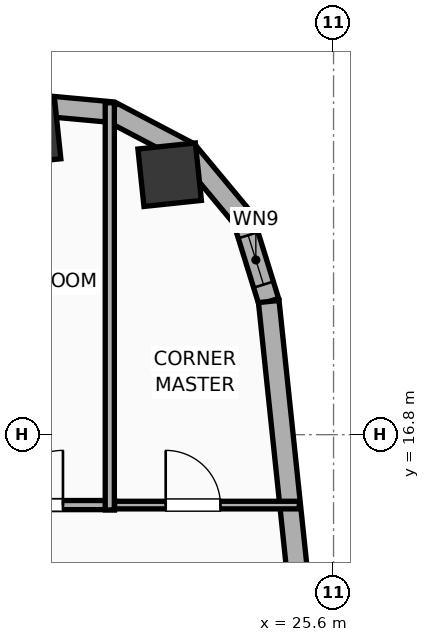
"""IFC4 building model, lengths in metres.
Left out: names, types, materials, properties, quantities, classifications, styles, units other than length and angle.
Written with IfcOpenShell. Run it as: python <this file> out.ifc"""

import sys

from ifc_helpers import new_model, si_unit, direction, frame, frame_2d, origin, origin_2d, place, context, subcontext, project, spatial, rectangle, hollow_rectangle, hollow_circle, extrude, element, fill, save


model = new_model("IFC4")
c1 = context("Model", 3, precision=1e-05, world=origin(), true_north=direction((0.0, 1.0)))
c2 = subcontext(c1, "Body", "Model", "MODEL_VIEW")
j1 = project(units=[si_unit("LENGTHUNIT", "METRE"), si_unit("PLANEANGLEUNIT", "RADIAN")], contexts=[c1])
p1 = place(None, origin())
s1 = spatial("IfcSite", under=j1, at=p1, CompositionType="ELEMENT")
p2 = place(p1, origin())
s2 = spatial("IfcBuilding", under=s1, at=p2, CompositionType="ELEMENT")
p3 = place(p2, frame((0.0, 0.0, 163.8)))
s3 = spatial("IfcBuildingStorey", under=s2, at=p3, CompositionType="ELEMENT", Elevation=163.8)
p4 = place(p3, frame((22.905, 21.075, 0.0), z_axis=(0.0, 0.0, 1.0), x_axis=(0.994521895368, 0.104528463268, 0.0)))
e1 = element("IfcColumn", 1, at=p4, inside=s3, PredefinedType="COLUMN", context=c2, shape_type="SweptSolid", body=[
    extrude(hollow_circle(Radius=0.475, WallThickness=0.032, at=origin_2d()), origin(), (0.0, 0.0, 1.0), 3.9),
])
p5 = place(p3, frame((20.593, 21.76, 0.0), z_axis=(0.0, 0.0, 1.0), x_axis=(0.994521895368, 0.104528463268, 0.0)))
e2 = element("IfcColumn", 2, at=p5, inside=s3, PredefinedType="COLUMN", context=c2, shape_type="SweptSolid", body=[
    extrude(hollow_rectangle(XDim=0.95, YDim=0.95, WallThickness=0.032, at=origin_2d()), origin(), (0.0, 0.0, 1.0), 3.9),
])
p6 = place(p3, frame((20.526, 22.235, 0.0), z_axis=(0.0, 0.0, 1.0), x_axis=(0.995800460351, -0.091550222087, 0.0)))
e3 = element("IfcWall", 3, at=p6, inside=s3, PredefinedType="ELEMENTEDWALL", context=c2, shape_type="SweptSolid", body=[
    extrude(rectangle(XDim=1.432, YDim=0.34, at=frame_2d((0.716, 0.0))), origin(), (0.0, 0.0, 1.0), 3.65),
])
p7 = place(p3, frame((21.952, 22.104, 0.0), z_axis=(0.0, 0.0, 1.0), x_axis=(0.885023004245, -0.465547292933, 0.0)))
e4 = element("IfcWall", 4, at=p7, inside=s3, PredefinedType="ELEMENTEDWALL", context=c2, shape_type="SweptSolid", body=[
    extrude(rectangle(XDim=1.415, YDim=0.34, at=frame_2d((0.708, 0.0))), origin(), (0.0, 0.0, 1.0), 3.65),
])
p8 = place(p3, frame((23.205, 21.445, 0.0), z_axis=(0.0, 0.0, 1.0), x_axis=(0.639539337522, -0.768758372808, 0.0)))
e5 = element("IfcWall", 5, at=p8, inside=s3, PredefinedType="ELEMENTEDWALL", context=c2, shape_type="SweptSolid", body=[
    extrude(rectangle(XDim=1.415, YDim=0.34, at=frame_2d((0.708, 0.0))), origin(), (0.0, 0.0, 1.0), 3.65),
])
p9 = place(p3, frame((24.11, 20.357, 0.0), z_axis=(0.0, 0.0, 1.0), x_axis=(0.296420660287, -0.955057481074, 0.0)))
e6 = element("IfcWall", 6, at=p9, inside=s3, PredefinedType="ELEMENTEDWALL", context=c2, shape_type="SweptSolid", body=[
    extrude(rectangle(XDim=1.432, YDim=0.34, at=frame_2d((0.716, 0.0))), origin(), (0.0, 0.0, 1.0), 3.65),
])
p10 = place(p9, frame((0.291, 0.0, 0.75)))
e7 = element("IfcOpeningElement", 7, at=p10, cuts=e6, PredefinedType="OPENING", context=c2, shape_type="SweptSolid", body=[
    extrude(rectangle(XDim=0.85, YDim=2.05, at=frame_2d((0.425, 1.025))), frame((0.0, 0.18, 0.0), z_axis=(0.0, -1.0, 0.0), x_axis=(1.0, 0.0, 0.0)), (0.0, 0.0, 1.0), 0.36),
])
p11 = place(p3, frame((24.534, 18.99, 0.0), z_axis=(0.0, 0.0, 1.0), x_axis=(0.104534959766, -0.994521212537, 0.0)))
e8 = element("IfcWall", 8, at=p11, inside=s3, PredefinedType="ELEMENTEDWALL", context=c2, shape_type="SweptSolid", body=[
    extrude(rectangle(XDim=33.166, YDim=0.34, at=frame_2d((16.583, 0.0))), origin(), (0.0, 0.0, 1.0), 3.65),
])
p12 = place(p11, frame((6.542, 0.0, 0.75)))
e9 = element("IfcOpeningElement", 9, at=p12, cuts=e8, PredefinedType="OPENING", context=c2, shape_type="SweptSolid", body=[
    extrude(rectangle(XDim=1.8, YDim=2.1, at=frame_2d((0.9, 1.05))), frame((0.0, 0.18, 0.0), z_axis=(0.0, -1.0, 0.0), x_axis=(1.0, 0.0, 0.0)), (0.0, 0.0, 1.0), 0.36),
])
p13 = place(p11, frame((24.825, 0.0, 0.75)))
e10 = element("IfcOpeningElement", 10, at=p13, cuts=e8, PredefinedType="OPENING", context=c2, shape_type="SweptSolid", body=[
    extrude(rectangle(XDim=1.8, YDim=2.1, at=frame_2d((0.9, 1.05))), frame((0.0, 0.18, 0.0), z_axis=(0.0, -1.0, 0.0), x_axis=(1.0, 0.0, 0.0)), (0.0, 0.0, 1.0), 0.36),
])
p14 = place(p11, frame((20.332, 0.0, 0.75)))
e11 = element("IfcOpeningElement", 11, at=p14, cuts=e8, PredefinedType="OPENING", context=c2, shape_type="SweptSolid", body=[
    extrude(rectangle(XDim=1.2, YDim=2.05, at=frame_2d((0.6, 1.025))), frame((0.0, 0.18, 0.0), z_axis=(0.0, -1.0, 0.0), x_axis=(1.0, 0.0, 0.0)), (0.0, 0.0, 1.0), 0.36),
])
p15 = place(p3, frame((21.86, 15.642, 0.0), z_axis=(0.0, 0.0, 1.0), x_axis=(1.0, 0.0, 0.0)))
e12 = element("IfcWall", 12, at=p15, inside=s3, PredefinedType="PARTITIONING", context=c2, shape_type="SweptSolid", body=[
    extrude(rectangle(XDim=3.177, YDim=0.125, at=frame_2d((1.588, 0.0))), origin(), (0.0, 0.0, 1.0), 3.65),
])
p16 = place(p15, frame((0.979, 0.0, 0.0)))
e13 = element("IfcOpeningElement", 13, at=p16, cuts=e12, PredefinedType="OPENING", context=c2, shape_type="SweptSolid", body=[
    extrude(rectangle(XDim=0.9, YDim=2.05, at=frame_2d((0.45, 1.025))), frame((0.0, 0.073, 0.0), z_axis=(0.0, -1.0, 0.0), x_axis=(1.0, 0.0, 0.0)), (0.0, 0.0, 1.0), 0.145),
])
p17 = place(p3, frame((19.4, 15.642, 0.0), z_axis=(0.0, 0.0, 1.0), x_axis=(1.0, 0.0, 0.0)))
e14 = element("IfcWall", 14, at=p17, inside=s3, PredefinedType="PLUMBINGWALL", context=c2, shape_type="SweptSolid", body=[
    extrude(rectangle(XDim=2.6, YDim=0.15, at=frame_2d((1.3, 0.0))), origin(), (0.0, 0.0, 1.0), 3.65),
])
p18 = place(p17, frame((0.85, 0.0, 0.0)))
e15 = element("IfcOpeningElement", 15, at=p18, cuts=e14, PredefinedType="OPENING", context=c2, shape_type="SweptSolid", body=[
    extrude(rectangle(XDim=0.9, YDim=2.05, at=frame_2d((0.45, 1.025))), frame((0.0, 0.085, 0.0), z_axis=(0.0, -1.0, 0.0), x_axis=(1.0, 0.0, 0.0)), (0.0, 0.0, 1.0), 0.17),
])
p19 = place(p3, frame((21.92, 15.562, 0.0), z_axis=(0.0, 0.0, 1.0), x_axis=(0.0, 1.0, 0.0)))
e16 = element("IfcWall", 16, at=p19, inside=s3, PredefinedType="PLUMBINGWALL", context=c2, shape_type="SweptSolid", body=[
    extrude(rectangle(XDim=6.696, YDim=0.15, at=frame_2d((3.348, 0.0))), origin(), (0.0, 0.0, 1.0), 3.04),
])
p20 = place(p10, origin())
e17 = element("IfcWindow", 17, at=p20, inside=s3, PartitioningType="SINGLE_PANEL", PredefinedType="WINDOW", context=c2, shape_type="SweptSolid", body=[
    extrude(rectangle(XDim=0.85, YDim=2.05, at=frame_2d((0.425, 1.025))), frame((0.0, 0.03, 0.0), z_axis=(0.0, -1.0, 0.0), x_axis=(1.0, 0.0, 0.0)), (0.0, 0.0, 1.0), 0.06),
])
fill(e7, e17)
p21 = place(p16, origin())
e18 = element("IfcDoor", 18, at=p21, inside=s3, OperationType="SINGLE_SWING_LEFT", PredefinedType="DOOR", context=c2, shape_type="SweptSolid", body=[
    extrude(rectangle(XDim=0.9, YDim=2.05, at=frame_2d((0.45, 1.025))), frame((0.0, 0.025, 0.0), z_axis=(0.0, -1.0, 0.0), x_axis=(1.0, 0.0, 0.0)), (0.0, 0.0, 1.0), 0.05),
])
fill(e13, e18)
p22 = place(p18, origin())
e19 = element("IfcDoor", 19, at=p22, inside=s3, OperationType="SINGLE_SWING_RIGHT", PredefinedType="DOOR", context=c2, shape_type="SweptSolid", body=[
    extrude(rectangle(XDim=0.9, YDim=2.05, at=frame_2d((0.45, 1.025))), frame((0.0, 0.025, 0.0), z_axis=(0.0, -1.0, 0.0), x_axis=(1.0, 0.0, 0.0)), (0.0, 0.0, 1.0), 0.05),
])
fill(e15, e19)
save(model, sys.argv[1])
